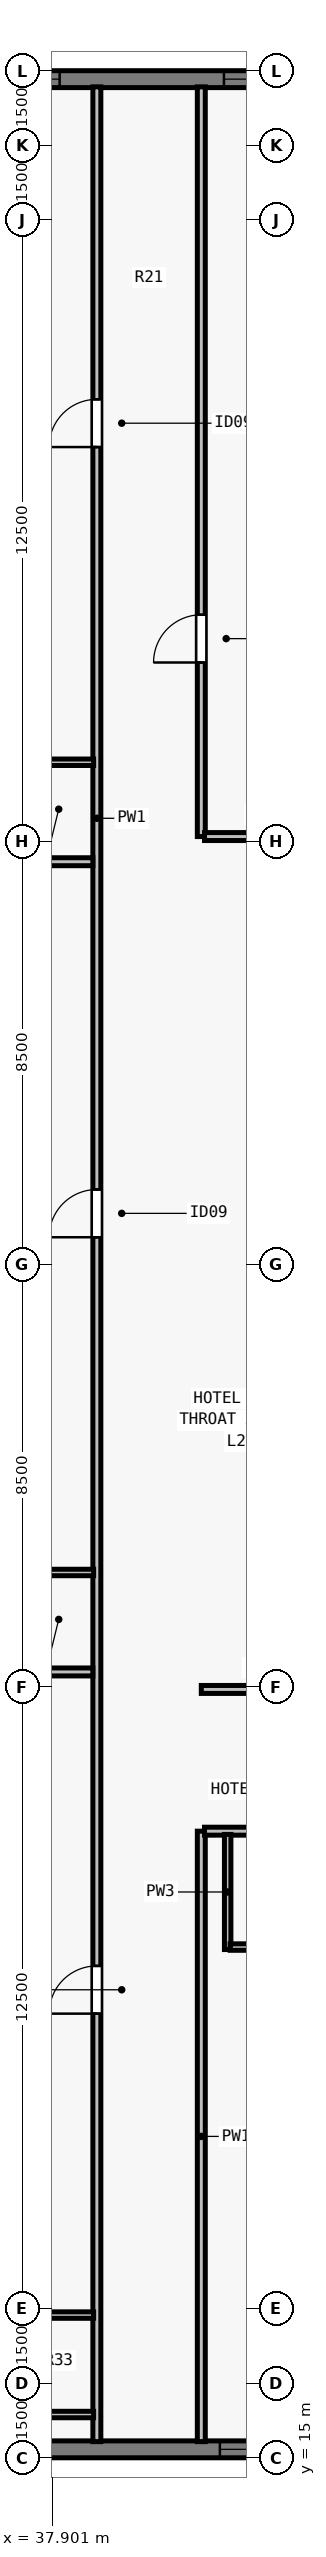
"""IFC4 building model, lengths in metres.
Left out: names, types, materials, properties, quantities, classifications, styles, units other than length and angle.
Written with IfcOpenShell. Run it as: python <this file> out.ifc"""

import sys

from ifc_helpers import new_model, si_unit, direction, frame, frame_2d, origin, place, context, subcontext, project, spatial, rectangle, extrude, element, fill, save


model = new_model("IFC4")
c1 = context("Model", 3, precision=1e-05, world=origin(), true_north=direction((0.0, 1.0)))
c2 = subcontext(c1, "Body", "Model", "MODEL_VIEW")
j1 = project(units=[si_unit("LENGTHUNIT", "METRE"), si_unit("PLANEANGLEUNIT", "RADIAN")], contexts=[c1])
p1 = place(None, origin())
s1 = spatial("IfcSite", under=j1, at=p1, CompositionType="ELEMENT")
p2 = place(p1, origin())
s2 = spatial("IfcBuilding", under=s1, at=p2, CompositionType="ELEMENT")
p3 = place(p2, frame((0.0, 0.0, 109.5)))
s3 = spatial("IfcBuildingStorey", under=s2, at=p3, CompositionType="ELEMENT", Elevation=109.5)
p4 = place(p3, frame((32.0, 62.83, 0.0), z_axis=(0.0, 0.0, 1.0), x_axis=(1.0, 0.0, 0.0)))
e1 = element("IfcWall", 1, at=p4, inside=s3, PredefinedType="SOLIDWALL", context=c2, shape_type="SweptSolid", body=[
    extrude(rectangle(XDim=39.682, YDim=0.34, at=frame_2d((19.841, 0.0))), origin(), (0.0, 0.0, 1.0), 3.28),
])
p5 = place(p4, frame((4.302, 0.0, 0.8)))
e2 = element("IfcOpeningElement", 2, at=p5, cuts=e1, PredefinedType="OPENING", context=c2, shape_type="SweptSolid", body=[
    extrude(rectangle(XDim=1.75, YDim=1.66, at=frame_2d((0.875, 0.83))), frame((0.0, 0.18, 0.0), z_axis=(0.0, -1.0, 0.0), x_axis=(1.0, 0.0, 0.0)), (0.0, 0.0, 1.0), 0.36),
])
p6 = place(p4, frame((9.355, 0.0, 0.8)))
e3 = element("IfcOpeningElement", 3, at=p6, cuts=e1, PredefinedType="OPENING", context=c2, shape_type="SweptSolid", body=[
    extrude(rectangle(XDim=1.35, YDim=1.66, at=frame_2d((0.675, 0.83))), frame((0.0, 0.18, 0.0), z_axis=(0.0, -1.0, 0.0), x_axis=(1.0, 0.0, 0.0)), (0.0, 0.0, 1.0), 0.36),
])
p7 = place(p4, frame((11.859, 0.0, 0.8)))
e4 = element("IfcOpeningElement", 4, at=p7, cuts=e1, PredefinedType="OPENING", context=c2, shape_type="SweptSolid", body=[
    extrude(rectangle(XDim=1.75, YDim=1.66, at=frame_2d((0.875, 0.83))), frame((0.0, 0.18, 0.0), z_axis=(0.0, -1.0, 0.0), x_axis=(1.0, 0.0, 0.0)), (0.0, 0.0, 1.0), 0.36),
])
p8 = place(p4, frame((18.966, 0.0, 0.8)))
e5 = element("IfcOpeningElement", 5, at=p8, cuts=e1, PredefinedType="OPENING", context=c2, shape_type="SweptSolid", body=[
    extrude(rectangle(XDim=1.75, YDim=1.66, at=frame_2d((0.875, 0.83))), frame((0.0, 0.18, 0.0), z_axis=(0.0, -1.0, 0.0), x_axis=(1.0, 0.0, 0.0)), (0.0, 0.0, 1.0), 0.36),
])
p9 = place(p4, frame((21.469, 0.0, 0.8)))
e6 = element("IfcOpeningElement", 6, at=p9, cuts=e1, PredefinedType="OPENING", context=c2, shape_type="SweptSolid", body=[
    extrude(rectangle(XDim=1.35, YDim=1.66, at=frame_2d((0.675, 0.83))), frame((0.0, 0.18, 0.0), z_axis=(0.0, -1.0, 0.0), x_axis=(1.0, 0.0, 0.0)), (0.0, 0.0, 1.0), 0.36),
])
p10 = place(p4, frame((26.073, 0.0, 0.8)))
e7 = element("IfcOpeningElement", 7, at=p10, cuts=e1, PredefinedType="OPENING", context=c2, shape_type="SweptSolid", body=[
    extrude(rectangle(XDim=1.75, YDim=1.66, at=frame_2d((0.875, 0.83))), frame((0.0, 0.18, 0.0), z_axis=(0.0, -1.0, 0.0), x_axis=(1.0, 0.0, 0.0)), (0.0, 0.0, 1.0), 0.36),
])
p11 = place(p4, frame((29.377, 0.0, 0.8)))
e8 = element("IfcOpeningElement", 8, at=p11, cuts=e1, PredefinedType="OPENING", context=c2, shape_type="SweptSolid", body=[
    extrude(rectangle(XDim=1.35, YDim=1.66, at=frame_2d((0.675, 0.83))), frame((0.0, 0.18, 0.0), z_axis=(0.0, -1.0, 0.0), x_axis=(1.0, 0.0, 0.0)), (0.0, 0.0, 1.0), 0.36),
])
p12 = place(p4, frame((33.63, 0.0, 0.8)))
e9 = element("IfcOpeningElement", 9, at=p12, cuts=e1, PredefinedType="OPENING", context=c2, shape_type="SweptSolid", body=[
    extrude(rectangle(XDim=1.75, YDim=1.66, at=frame_2d((0.875, 0.83))), frame((0.0, 0.18, 0.0), z_axis=(0.0, -1.0, 0.0), x_axis=(1.0, 0.0, 0.0)), (0.0, 0.0, 1.0), 0.36),
])
p13 = place(p3, frame((72.0, 15.17, 0.0), z_axis=(0.0, 0.0, 1.0), x_axis=(-1.0, 0.0, 0.0)))
e10 = element("IfcWall", 10, at=p13, inside=s3, PredefinedType="SOLIDWALL", context=c2, shape_type="SweptSolid", body=[
    extrude(rectangle(XDim=39.682, YDim=0.34, at=frame_2d((19.841, 0.0))), origin(), (0.0, 0.0, 1.0), 3.28),
])
p14 = place(p13, frame((9.355, 0.0, 0.8)))
e11 = element("IfcOpeningElement", 11, at=p14, cuts=e10, PredefinedType="OPENING", context=c2, shape_type="SweptSolid", body=[
    extrude(rectangle(XDim=1.35, YDim=1.66, at=frame_2d((0.675, 0.83))), frame((0.0, 0.18, 0.0), z_axis=(0.0, -1.0, 0.0), x_axis=(1.0, 0.0, 0.0)), (0.0, 0.0, 1.0), 0.36),
])
p15 = place(p13, frame((11.859, 0.0, 0.8)))
e12 = element("IfcOpeningElement", 12, at=p15, cuts=e10, PredefinedType="OPENING", context=c2, shape_type="SweptSolid", body=[
    extrude(rectangle(XDim=1.75, YDim=1.66, at=frame_2d((0.875, 0.83))), frame((0.0, 0.18, 0.0), z_axis=(0.0, -1.0, 0.0), x_axis=(1.0, 0.0, 0.0)), (0.0, 0.0, 1.0), 0.36),
])
p16 = place(p13, frame((16.062, 0.0, 0.8)))
e13 = element("IfcOpeningElement", 13, at=p16, cuts=e10, PredefinedType="OPENING", context=c2, shape_type="SweptSolid", body=[
    extrude(rectangle(XDim=1.35, YDim=1.66, at=frame_2d((0.675, 0.83))), frame((0.0, 0.18, 0.0), z_axis=(0.0, -1.0, 0.0), x_axis=(1.0, 0.0, 0.0)), (0.0, 0.0, 1.0), 0.36),
])
p17 = place(p13, frame((18.116, 0.0, 0.8)))
e14 = element("IfcOpeningElement", 14, at=p17, cuts=e10, PredefinedType="OPENING", context=c2, shape_type="SweptSolid", body=[
    extrude(rectangle(XDim=1.75, YDim=1.66, at=frame_2d((0.875, 0.83))), frame((0.0, 0.18, 0.0), z_axis=(0.0, -1.0, 0.0), x_axis=(1.0, 0.0, 0.0)), (0.0, 0.0, 1.0), 0.36),
])
p18 = place(p13, frame((22.719, 0.0, 0.8)))
e15 = element("IfcOpeningElement", 15, at=p18, cuts=e10, PredefinedType="OPENING", context=c2, shape_type="SweptSolid", body=[
    extrude(rectangle(XDim=1.35, YDim=1.66, at=frame_2d((0.675, 0.83))), frame((0.0, 0.18, 0.0), z_axis=(0.0, -1.0, 0.0), x_axis=(1.0, 0.0, 0.0)), (0.0, 0.0, 1.0), 0.36),
])
p19 = place(p13, frame((26.073, 0.0, 0.8)))
e16 = element("IfcOpeningElement", 16, at=p19, cuts=e10, PredefinedType="OPENING", context=c2, shape_type="SweptSolid", body=[
    extrude(rectangle(XDim=1.75, YDim=1.66, at=frame_2d((0.875, 0.83))), frame((0.0, 0.18, 0.0), z_axis=(0.0, -1.0, 0.0), x_axis=(1.0, 0.0, 0.0)), (0.0, 0.0, 1.0), 0.36),
])
p20 = place(p13, frame((29.377, 0.0, 0.8)))
e17 = element("IfcOpeningElement", 17, at=p20, cuts=e10, PredefinedType="OPENING", context=c2, shape_type="SweptSolid", body=[
    extrude(rectangle(XDim=1.35, YDim=1.66, at=frame_2d((0.675, 0.83))), frame((0.0, 0.18, 0.0), z_axis=(0.0, -1.0, 0.0), x_axis=(1.0, 0.0, 0.0)), (0.0, 0.0, 1.0), 0.36),
])
p21 = place(p3, frame((38.8, 15.325, 0.0), z_axis=(0.0, 0.0, 1.0), x_axis=(0.0, 1.0, 0.0)))
e18 = element("IfcWall", 18, at=p21, inside=s3, PredefinedType="PARTITIONING", context=c2, shape_type="SweptSolid", body=[
    extrude(rectangle(XDim=47.35, YDim=0.16, at=frame_2d((23.675, 0.0))), origin(), (0.0, 0.0, 1.0), 2.555),
])
p22 = place(p21, frame((8.606, 0.0, 0.0)))
e19 = element("IfcOpeningElement", 19, at=p22, cuts=e18, PredefinedType="OPENING", context=c2, shape_type="SweptSolid", body=[
    extrude(rectangle(XDim=0.96, YDim=2.15, at=frame_2d((0.48, 1.075))), frame((0.0, 0.09, 0.0), z_axis=(0.0, -1.0, 0.0), x_axis=(1.0, 0.0, 0.0)), (0.0, 0.0, 1.0), 0.18),
])
p23 = place(p21, frame((24.218, 0.0, 0.0)))
e20 = element("IfcOpeningElement", 20, at=p23, cuts=e18, PredefinedType="OPENING", context=c2, shape_type="SweptSolid", body=[
    extrude(rectangle(XDim=0.96, YDim=2.15, at=frame_2d((0.48, 1.075))), frame((0.0, 0.09, 0.0), z_axis=(0.0, -1.0, 0.0), x_axis=(1.0, 0.0, 0.0)), (0.0, 0.0, 1.0), 0.18),
])
p24 = place(p21, frame((40.107, 0.0, 0.0)))
e21 = element("IfcOpeningElement", 21, at=p24, cuts=e18, PredefinedType="OPENING", context=c2, shape_type="SweptSolid", body=[
    extrude(rectangle(XDim=0.96, YDim=2.15, at=frame_2d((0.48, 1.075))), frame((0.0, 0.09, 0.0), z_axis=(0.0, -1.0, 0.0), x_axis=(1.0, 0.0, 0.0)), (0.0, 0.0, 1.0), 0.18),
])
p25 = place(p3, frame((40.9, 15.325, 0.0), z_axis=(0.0, 0.0, 1.0), x_axis=(0.0, 1.0, 0.0)))
e22 = element("IfcWall", 22, at=p25, inside=s3, PredefinedType="PARTITIONING", context=c2, shape_type="SweptSolid", body=[
    extrude(rectangle(XDim=12.275, YDim=0.16, at=frame_2d((6.138, 0.0))), origin(), (0.0, 0.0, 1.0), 2.555),
])
p26 = place(p3, frame((40.9, 47.6, 0.0), z_axis=(0.0, 0.0, 1.0), x_axis=(0.0, 1.0, 0.0)))
e23 = element("IfcWall", 23, at=p26, inside=s3, PredefinedType="PARTITIONING", context=c2, shape_type="SweptSolid", body=[
    extrude(rectangle(XDim=15.075, YDim=0.16, at=frame_2d((7.538, 0.0))), origin(), (0.0, 0.0, 1.0), 2.555),
])
p27 = place(p26, frame((3.5, 0.0, 0.0)))
e24 = element("IfcOpeningElement", 24, at=p27, cuts=e23, PredefinedType="OPENING", context=c2, shape_type="SweptSolid", body=[
    extrude(rectangle(XDim=0.96, YDim=2.12, at=frame_2d((0.48, 1.06))), frame((0.0, 0.09, 0.0), z_axis=(0.0, -1.0, 0.0), x_axis=(1.0, 0.0, 0.0)), (0.0, 0.0, 1.0), 0.18),
])
p28 = place(p3, frame((40.9, 30.45, 0.0), z_axis=(0.0, 0.0, 1.0), x_axis=(1.0, 0.0, 0.0)))
e25 = element("IfcWall", 25, at=p28, inside=s3, PredefinedType="PARTITIONING", context=c2, shape_type="SweptSolid", body=[
    extrude(rectangle(XDim=2.335, YDim=0.16, at=frame_2d((1.167, 0.0))), origin(), (0.0, 0.0, 1.0), 3.28),
])
p29 = place(p3, frame((40.965, 47.6, 0.0), z_axis=(0.0, 0.0, 1.0), x_axis=(1.0, 0.0, 0.0)))
e26 = element("IfcWall", 26, at=p29, inside=s3, PredefinedType="PARTITIONING", context=c2, shape_type="SweptSolid", body=[
    extrude(rectangle(XDim=2.27, YDim=0.16, at=frame_2d((1.135, 0.0))), origin(), (0.0, 0.0, 1.0), 3.28),
])
p30 = place(p3, frame((40.965, 27.6, 0.0), z_axis=(0.0, 0.0, 1.0), x_axis=(1.0, 0.0, 0.0)))
e27 = element("IfcWall", 27, at=p30, inside=s3, PredefinedType="PARTITIONING", context=c2, shape_type="SweptSolid", body=[
    extrude(rectangle(XDim=22.07, YDim=0.16, at=frame_2d((11.035, 0.0))), origin(), (0.0, 0.0, 1.0), 3.28),
])
p31 = place(p30, frame((6.085, 0.0, 0.0)))
e28 = element("IfcOpeningElement", 28, at=p31, cuts=e27, PredefinedType="OPENING", context=c2, shape_type="SweptSolid", body=[
    extrude(rectangle(XDim=0.96, YDim=2.15, at=frame_2d((0.48, 1.075))), frame((0.0, 0.09, 0.0), z_axis=(0.0, -1.0, 0.0), x_axis=(1.0, 0.0, 0.0)), (0.0, 0.0, 1.0), 0.18),
])
p32 = place(p30, frame((16.88, 0.0, 0.0)))
e29 = element("IfcOpeningElement", 29, at=p32, cuts=e27, PredefinedType="OPENING", context=c2, shape_type="SweptSolid", body=[
    extrude(rectangle(XDim=0.96, YDim=2.15, at=frame_2d((0.48, 1.075))), frame((0.0, 0.09, 0.0), z_axis=(0.0, -1.0, 0.0), x_axis=(1.0, 0.0, 0.0)), (0.0, 0.0, 1.0), 0.18),
])
p33 = place(p3, frame((41.43, 25.22, 0.0), z_axis=(0.0, 0.0, 1.0), x_axis=(0.0, 1.0, 0.0)))
e30 = element("IfcWall", 30, at=p33, inside=s3, PredefinedType="PLUMBINGWALL", context=c2, shape_type="SweptSolid", body=[
    extrude(rectangle(XDim=2.315, YDim=0.13, at=frame_2d((1.157, 0.0))), origin(), (0.0, 0.0, 1.0), 3.28),
])
p34 = place(p3, frame((41.48, 25.27, 0.0), z_axis=(0.0, 0.0, 1.0), x_axis=(1.0, 0.0, 0.0)))
e31 = element("IfcWall", 31, at=p34, inside=s3, PredefinedType="PLUMBINGWALL", context=c2, shape_type="SweptSolid", body=[
    extrude(rectangle(XDim=1.9, YDim=0.13, at=frame_2d((0.95, 0.0))), origin(), (0.0, 0.0, 1.0), 3.28),
])
p35 = place(p34, frame((0.54, 0.0, 0.0)))
e32 = element("IfcOpeningElement", 32, at=p35, cuts=e31, PredefinedType="OPENING", context=c2, shape_type="SweptSolid", body=[
    extrude(rectangle(XDim=0.82, YDim=2.1, at=frame_2d((0.41, 1.05))), frame((0.0, 0.075, 0.0), z_axis=(0.0, -1.0, 0.0), x_axis=(1.0, 0.0, 0.0)), (0.0, 0.0, 1.0), 0.15),
])
for number, where, z_axis, x_axis in (
    (33, (36.42, 15.87, 0.0), (0.0, 0.0, 1.0), (1.0, 0.0, 0.0)),
    (34, (36.42, 17.87, 0.0), (0.0, 0.0, 1.0), (1.0, 0.0, 0.0)),
):
    element("IfcWall", number, at=place(p3, frame(where, z_axis=z_axis, x_axis=x_axis)), inside=s3, PredefinedType="PLUMBINGWALL", context=c2, shape_type="SweptSolid", body=[
        extrude(rectangle(XDim=2.315, YDim=0.13, at=frame_2d((1.158, 0.0))), origin(), (0.0, 0.0, 1.0), 3.28),
    ])
p36 = place(p3, frame((28.325, 30.802, 0.0), z_axis=(0.0, 0.0, 1.0), x_axis=(1.0, 0.0, 0.0)))
e35 = element("IfcWall", 35, at=p36, inside=s3, PredefinedType="PARTITIONING", context=c2, shape_type="SweptSolid", body=[
    extrude(rectangle(XDim=10.395, YDim=0.16, at=frame_2d((5.198, 0.0))), origin(), (0.0, 0.0, 1.0), 3.28),
])
p37 = place(p3, frame((36.42, 32.802, 0.0), z_axis=(0.0, 0.0, 1.0), x_axis=(1.0, 0.0, 0.0)))
e36 = element("IfcWall", 36, at=p37, inside=s3, PredefinedType="PLUMBINGWALL", context=c2, shape_type="SweptSolid", body=[
    extrude(rectangle(XDim=2.315, YDim=0.13, at=frame_2d((1.158, 0.0))), origin(), (0.0, 0.0, 1.0), 3.28),
])
p38 = place(p3, frame((28.27, 47.094, 0.0), z_axis=(0.0, 0.0, 1.0), x_axis=(1.0, 0.0, 0.0)))
e37 = element("IfcWall", 37, at=p38, inside=s3, PredefinedType="PARTITIONING", context=c2, shape_type="SweptSolid", body=[
    extrude(rectangle(XDim=10.45, YDim=0.16, at=frame_2d((5.225, 0.0))), origin(), (0.0, 0.0, 1.0), 3.28),
])
p39 = place(p3, frame((36.42, 49.094, 0.0), z_axis=(0.0, 0.0, 1.0), x_axis=(1.0, 0.0, 0.0)))
e38 = element("IfcWall", 38, at=p39, inside=s3, PredefinedType="PLUMBINGWALL", context=c2, shape_type="SweptSolid", body=[
    extrude(rectangle(XDim=2.315, YDim=0.13, at=frame_2d((1.158, 0.0))), origin(), (0.0, 0.0, 1.0), 3.28),
])
p40 = place(p5, origin())
e39 = element("IfcWindow", 39, at=p40, inside=s3, PartitioningType="SINGLE_PANEL", PredefinedType="WINDOW", context=c2, shape_type="SweptSolid", body=[
    extrude(rectangle(XDim=1.75, YDim=1.66, at=frame_2d((0.875, 0.83))), frame((0.0, -0.05, 0.0), z_axis=(0.0, -1.0, 0.0), x_axis=(1.0, 0.0, 0.0)), (0.0, 0.0, 1.0), 0.06),
])
fill(e2, e39)
p41 = place(p6, origin())
e40 = element("IfcWindow", 40, at=p41, inside=s3, PartitioningType="SINGLE_PANEL", PredefinedType="WINDOW", context=c2, shape_type="SweptSolid", body=[
    extrude(rectangle(XDim=1.35, YDim=1.66, at=frame_2d((0.675, 0.83))), frame((0.0, -0.05, 0.0), z_axis=(0.0, -1.0, 0.0), x_axis=(1.0, 0.0, 0.0)), (0.0, 0.0, 1.0), 0.06),
])
fill(e3, e40)
p42 = place(p20, origin())
e41 = element("IfcWindow", 41, at=p42, inside=s3, PartitioningType="SINGLE_PANEL", PredefinedType="WINDOW", context=c2, shape_type="SweptSolid", body=[
    extrude(rectangle(XDim=1.35, YDim=1.66, at=frame_2d((0.675, 0.83))), frame((0.0, -0.05, 0.0), z_axis=(0.0, -1.0, 0.0), x_axis=(1.0, 0.0, 0.0)), (0.0, 0.0, 1.0), 0.06),
])
fill(e17, e41)
p43 = place(p27, origin())
e42 = element("IfcDoor", 42, at=p43, inside=s3, OperationType="SINGLE_SWING_LEFT", PredefinedType="DOOR", context=c2, shape_type="SweptSolid", body=[
    extrude(rectangle(XDim=0.96, YDim=2.12, at=frame_2d((0.48, 1.06))), frame((0.0, 0.025, 0.0), z_axis=(0.0, -1.0, 0.0), x_axis=(1.0, 0.0, 0.0)), (0.0, 0.0, 1.0), 0.05),
])
fill(e24, e42)
p44 = place(p22, origin())
e43 = element("IfcDoor", 43, at=p44, inside=s3, OperationType="SINGLE_SWING_LEFT", PredefinedType="DOOR", context=c2, shape_type="SweptSolid", body=[
    extrude(rectangle(XDim=0.96, YDim=2.15, at=frame_2d((0.48, 1.075))), frame((0.0, 0.025, 0.0), z_axis=(0.0, -1.0, 0.0), x_axis=(1.0, 0.0, 0.0)), (0.0, 0.0, 1.0), 0.05),
])
fill(e19, e43)
p45 = place(p23, origin())
e44 = element("IfcDoor", 44, at=p45, inside=s3, OperationType="SINGLE_SWING_LEFT", PredefinedType="DOOR", context=c2, shape_type="SweptSolid", body=[
    extrude(rectangle(XDim=0.96, YDim=2.15, at=frame_2d((0.48, 1.075))), frame((0.0, 0.025, 0.0), z_axis=(0.0, -1.0, 0.0), x_axis=(1.0, 0.0, 0.0)), (0.0, 0.0, 1.0), 0.05),
])
fill(e20, e44)
p46 = place(p24, origin())
e45 = element("IfcDoor", 45, at=p46, inside=s3, OperationType="SINGLE_SWING_LEFT", PredefinedType="DOOR", context=c2, shape_type="SweptSolid", body=[
    extrude(rectangle(XDim=0.96, YDim=2.15, at=frame_2d((0.48, 1.075))), frame((0.0, 0.025, 0.0), z_axis=(0.0, -1.0, 0.0), x_axis=(1.0, 0.0, 0.0)), (0.0, 0.0, 1.0), 0.05),
])
fill(e21, e45)
save(model, sys.argv[1])
